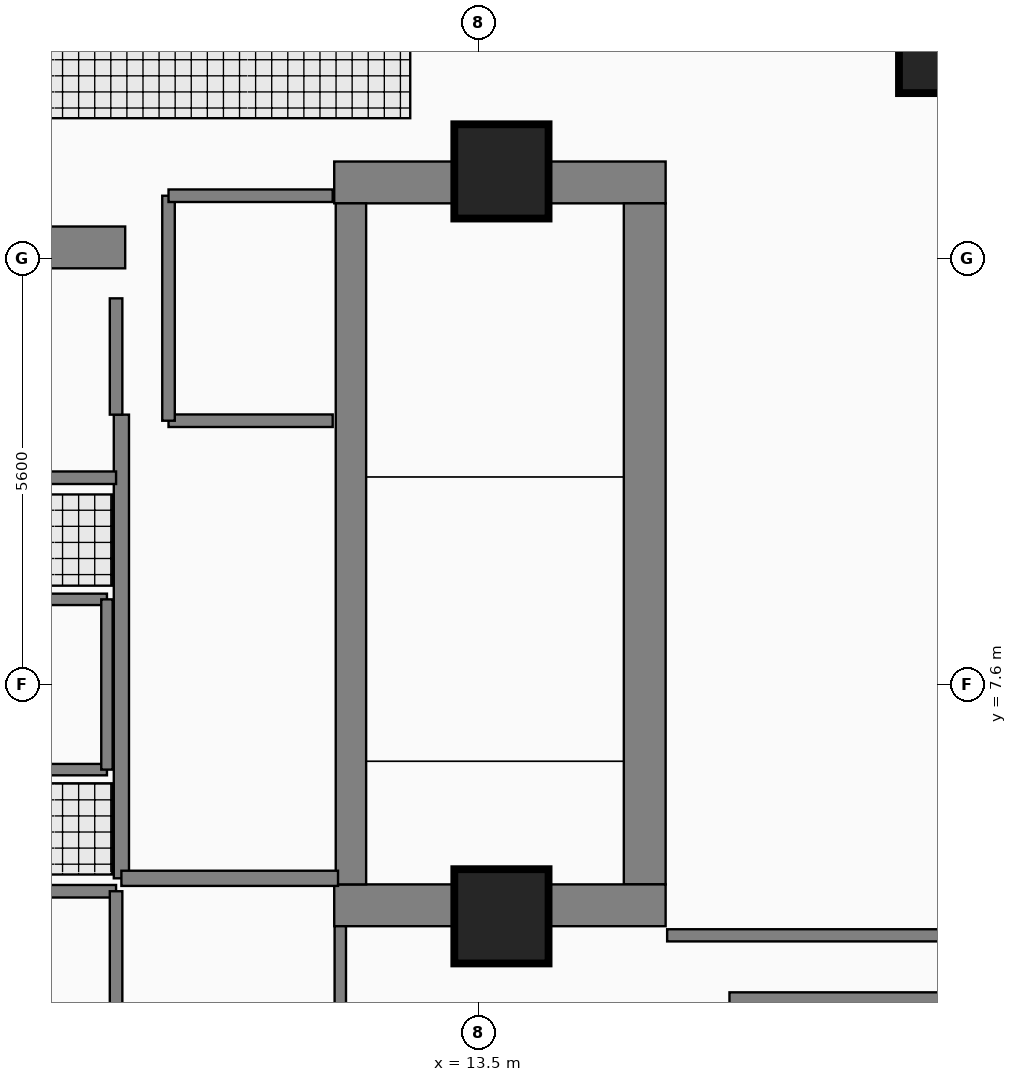
"""IFC4 building model, lengths in metres.
Left out: names, types, materials, properties, quantities, classifications, styles, units other than length and angle.
Written with IfcOpenShell. Run it as: python <this file> out.ifc"""

import sys

from ifc_helpers import new_model, si_unit, direction, frame, frame_2d, origin, origin_2d, place, context, subcontext, project, spatial, rectangle, extrude, element, fill, save


model = new_model("IFC4")
c1 = context("Model", 3, precision=1e-05, world=origin(), true_north=direction((0.0, 1.0)))
c2 = subcontext(c1, "Body", "Model", "MODEL_VIEW")
j1 = project(units=[si_unit("LENGTHUNIT", "METRE"), si_unit("PLANEANGLEUNIT", "RADIAN")], contexts=[c1])
p1 = place(None, origin())
s1 = spatial("IfcSite", under=j1, at=p1, CompositionType="ELEMENT")
p2 = place(p1, origin())
s2 = spatial("IfcBuilding", under=s1, at=p2, CompositionType="ELEMENT")
p3 = place(p2, frame((0.0, 0.0, 284.05)))
s3 = spatial("IfcBuildingStorey", under=s2, at=p3, CompositionType="ELEMENT", Elevation=284.05)
p4 = place(p3, frame((11.6, 14.205, 0.0), z_axis=(0.0, 0.0, 1.0), x_axis=(1.0, 0.0, 0.0)))
e1 = element("IfcWall", 1, at=p4, inside=s3, PredefinedType="SHEAR", context=c2, shape_type="SweptSolid", body=[
    extrude(rectangle(XDim=4.36, YDim=0.55, at=frame_2d((2.18, 0.0))), origin(), (0.0, 0.0, 1.0), 4.21),
])
p5 = place(p3, frame((15.685, 4.97, 0.0), z_axis=(0.0, 0.0, 1.0), x_axis=(0.0, 1.0, 0.0)))
e2 = element("IfcWall", 2, at=p5, inside=s3, PredefinedType="SHEAR", context=c2, shape_type="SweptSolid", body=[
    extrude(rectangle(XDim=8.96, YDim=0.55, at=frame_2d((4.48, 0.0))), origin(), (0.0, 0.0, 1.0), 4.21),
])
p6 = place(p3, frame((11.6, 4.695, 0.0), z_axis=(0.0, 0.0, 1.0), x_axis=(1.0, 0.0, 0.0)))
e3 = element("IfcWall", 3, at=p6, inside=s3, PredefinedType="SHEAR", context=c2, shape_type="SweptSolid", body=[
    extrude(rectangle(XDim=4.36, YDim=0.55, at=frame_2d((2.18, 0.0))), origin(), (0.0, 0.0, 1.0), 4.21),
])
p7 = place(p3, frame((1.25, 13.35, 0.0), z_axis=(0.0, 0.0, 1.0), x_axis=(1.0, 0.0, 0.0)))
e4 = element("IfcWall", 4, at=p7, inside=s3, PredefinedType="SHEAR", context=c2, shape_type="SweptSolid", body=[
    extrude(rectangle(XDim=7.6, YDim=0.55, at=frame_2d((3.8, 0.0))), origin(), (0.0, 0.0, 1.0), 4.18),
])
p8 = place(p3, frame((11.82, 13.93, 0.0), z_axis=(0.0, 0.0, 1.0), x_axis=(0.0, -1.0, 0.0)))
e5 = element("IfcWall", 5, at=p8, inside=s3, PredefinedType="SHEAR", context=c2, shape_type="SweptSolid", body=[
    extrude(rectangle(XDim=8.96, YDim=0.4, at=frame_2d((4.48, 0.0))), origin(), (0.0, 0.0, 1.0), 4.21),
])
p9 = place(p8, frame((7.53, 0.0, 0.0)))
e6 = element("IfcOpeningElement", 6, at=p9, cuts=e5, PredefinedType="OPENING", context=c2, shape_type="SweptSolid", body=[
    extrude(rectangle(XDim=1.12, YDim=2.22, at=frame_2d((0.56, 1.11))), frame((0.0, 0.21, 0.0), z_axis=(0.0, -1.0, 0.0), x_axis=(1.0, 0.0, 0.0)), (0.0, 0.0, 1.0), 0.42),
])
for number, where, z_axis, x_axis in (
    (7, (13.8, 14.35, 0.0), (0.0, 0.0, 1.0), (1.0, 0.0, 0.0)),
    (8, (13.8, 4.55, 0.0), (0.0, 0.0, 1.0), (1.0, 0.0, 0.0)),
):
    element("IfcColumn", number, at=place(p3, frame(where, z_axis=z_axis, x_axis=x_axis)), inside=s3, PredefinedType="COLUMN", context=c2, shape_type="SweptSolid", body=[
        extrude(rectangle(XDim=1.2, YDim=1.2, at=origin_2d()), origin(), (0.0, 0.0, 1.0), 4.4),
    ])
p10 = place(p3, frame((19.55, 15.9, 0.0), z_axis=(0.0, 0.0, 1.0), x_axis=(1.0, 0.0, 0.0)))
e9 = element("IfcColumn", 9, at=p10, inside=s3, PredefinedType="COLUMN", context=c2, shape_type="SweptSolid", body=[
    extrude(rectangle(XDim=1.0, YDim=1.0, at=origin_2d()), origin(), (0.0, 0.0, 1.0), 4.4),
])
p11 = place(p3, frame((20.2, 3.4, 0.0), z_axis=(0.0, 0.0, 1.0), x_axis=(-1.0, 0.0, 0.0)))
e10 = element("IfcWall", 10, at=p11, inside=s3, PredefinedType="STANDARD", context=c2, shape_type="SweptSolid", body=[
    extrude(rectangle(XDim=3.4, YDim=0.3, at=frame_2d((1.7, 0.0))), origin(), (0.0, 0.0, 1.0), 4.18),
])
p12 = place(p11, frame((1.125, 0.0, 1.25)))
e11 = element("IfcOpeningElement", 11, at=p12, cuts=e10, PredefinedType="OPENING", context=c2, shape_type="SweptSolid", body=[
    extrude(rectangle(XDim=1.15, YDim=1.55, at=frame_2d((0.575, 0.775))), frame((0.0, 0.16, 0.0), z_axis=(0.0, -1.0, 0.0), x_axis=(1.0, 0.0, 0.0)), (0.0, 0.0, 1.0), 0.32),
])
p13 = place(p3, frame((8.8, 11.15, 0.0), z_axis=(0.0, 0.0, 1.0), x_axis=(0.0, -1.0, 0.0)))
e12 = element("IfcWall", 12, at=p13, inside=s3, PredefinedType="PARTITIONING", context=c2, shape_type="SweptSolid", body=[
    extrude(rectangle(XDim=6.1, YDim=0.2, at=frame_2d((3.05, 0.0))), origin(), (0.0, 0.0, 1.0), 4.18),
])
p14 = place(p13, frame((1.15, 0.0, 0.0)))
e13 = element("IfcOpeningElement", 13, at=p14, cuts=e12, PredefinedType="OPENING", context=c2, shape_type="SweptSolid", body=[
    extrude(rectangle(XDim=1.1, YDim=2.2, at=frame_2d((0.55, 1.1))), frame((0.0, 0.11, 0.0), z_axis=(0.0, -1.0, 0.0), x_axis=(1.0, 0.0, 0.0)), (0.0, 0.0, 1.0), 0.22),
])
p15 = place(p13, frame((4.75, 0.0, 0.0)))
e14 = element("IfcOpeningElement", 14, at=p15, cuts=e12, PredefinedType="OPENING", context=c2, shape_type="SweptSolid", body=[
    extrude(rectangle(XDim=1.1, YDim=2.2, at=frame_2d((0.55, 1.1))), frame((0.0, 0.11, 0.0), z_axis=(0.0, -1.0, 0.0), x_axis=(1.0, 0.0, 0.0)), (0.0, 0.0, 1.0), 0.22),
])
p16 = place(p3, frame((9.42, 11.07, 0.0), z_axis=(0.0, 0.0, 1.0), x_axis=(1.0, 0.0, 0.0)))
e15 = element("IfcWall", 15, at=p16, inside=s3, PredefinedType="PARTITIONING", context=c2, shape_type="SweptSolid", body=[
    extrude(rectangle(XDim=2.16, YDim=0.165, at=frame_2d((1.08, 0.0))), origin(), (0.0, 0.0, 1.0), 4.18),
])
p17 = place(p16, frame((0.53, 0.0, 0.0)))
e16 = element("IfcOpeningElement", 16, at=p17, cuts=e15, PredefinedType="OPENING", context=c2, shape_type="SweptSolid", body=[
    extrude(rectangle(XDim=1.15, YDim=2.25, at=frame_2d((0.575, 1.125))), frame((0.0, 0.093, 0.0), z_axis=(0.0, -1.0, 0.0), x_axis=(1.0, 0.0, 0.0)), (0.0, 0.0, 1.0), 0.185),
])
p18 = place(p3, frame((6.25, 4.88, 0.0), z_axis=(0.0, 0.0, 1.0), x_axis=(1.0, 0.0, 0.0)))
e17 = element("IfcWall", 17, at=p18, inside=s3, PredefinedType="PARTITIONING", context=c2, shape_type="SweptSolid", body=[
    extrude(rectangle(XDim=2.48, YDim=0.165, at=frame_2d((1.24, 0.0))), origin(), (0.0, 0.0, 1.0), 4.18),
])
p19 = place(p18, frame((0.69, 0.0, 0.0)))
e18 = element("IfcOpeningElement", 18, at=p19, cuts=e17, PredefinedType="OPENING", context=c2, shape_type="SweptSolid", body=[
    extrude(rectangle(XDim=1.1, YDim=2.25, at=frame_2d((0.55, 1.125))), frame((0.0, 0.093, 0.0), z_axis=(0.0, -1.0, 0.0), x_axis=(1.0, 0.0, 0.0)), (0.0, 0.0, 1.0), 0.185),
])
p20 = place(p3, frame((6.25, 10.32, 0.0), z_axis=(0.0, 0.0, 1.0), x_axis=(1.0, 0.0, 0.0)))
e19 = element("IfcWall", 19, at=p20, inside=s3, PredefinedType="PARTITIONING", context=c2, shape_type="SweptSolid", body=[
    extrude(rectangle(XDim=2.48, YDim=0.165, at=frame_2d((1.24, 0.0))), origin(), (0.0, 0.0, 1.0), 4.18),
])
p21 = place(p20, frame((0.69, 0.0, 0.0)))
e20 = element("IfcOpeningElement", 20, at=p21, cuts=e19, PredefinedType="OPENING", context=c2, shape_type="SweptSolid", body=[
    extrude(rectangle(XDim=1.1, YDim=2.25, at=frame_2d((0.55, 1.125))), frame((0.0, 0.093, 0.0), z_axis=(0.0, -1.0, 0.0), x_axis=(1.0, 0.0, 0.0)), (0.0, 0.0, 1.0), 0.185),
])
p22 = place(p3, frame((6.14, 8.72, 0.0), z_axis=(0.0, 0.0, 1.0), x_axis=(1.0, 0.0, 0.0)))
e21 = element("IfcWall", 21, at=p22, inside=s3, PredefinedType="PARTITIONING", context=c2, shape_type="SweptSolid", body=[
    extrude(rectangle(XDim=2.47, YDim=0.15, at=frame_2d((1.235, 0.0))), origin(), (0.0, 0.0, 1.0), 4.18),
])
p23 = place(p22, frame((0.785, 0.0, 0.0)))
e22 = element("IfcOpeningElement", 22, at=p23, cuts=e21, PredefinedType="OPENING", context=c2, shape_type="SweptSolid", body=[
    extrude(rectangle(XDim=0.9, YDim=2.15, at=frame_2d((0.45, 1.075))), frame((0.0, 0.085, 0.0), z_axis=(0.0, -1.0, 0.0), x_axis=(1.0, 0.0, 0.0)), (0.0, 0.0, 1.0), 0.17),
])
p24 = place(p3, frame((15.98, 4.3, 0.0), z_axis=(0.0, 0.0, 1.0), x_axis=(1.0, 0.0, 0.0)))
e23 = element("IfcWall", 23, at=p24, inside=s3, PredefinedType="PARTITIONING", context=c2, shape_type="SweptSolid", body=[
    extrude(rectangle(XDim=4.16, YDim=0.16, at=frame_2d((2.08, 0.0))), origin(), (0.0, 0.0, 1.0), 4.18),
])
p25 = place(p24, frame((1.605, 0.0, 0.0)))
e24 = element("IfcOpeningElement", 24, at=p25, cuts=e23, PredefinedType="OPENING", context=c2, shape_type="SweptSolid", body=[
    extrude(rectangle(XDim=0.95, YDim=2.15, at=frame_2d((0.475, 1.075))), frame((0.0, 0.09, 0.0), z_axis=(0.0, -1.0, 0.0), x_axis=(1.0, 0.0, 0.0)), (0.0, 0.0, 1.0), 0.18),
])
p26 = place(p3, frame((8.8, 5.05, 0.0), z_axis=(0.0, 0.0, 1.0), x_axis=(1.0, 0.0, 0.0)))
e25 = element("IfcWall", 25, at=p26, inside=s3, PredefinedType="PARTITIONING", context=c2, shape_type="SweptSolid", body=[
    extrude(rectangle(XDim=2.85, YDim=0.2, at=frame_2d((1.425, 0.0))), origin(), (0.0, 0.0, 1.0), 4.18),
])
p27 = place(p3, frame((9.42, 11.07, 0.0), z_axis=(0.0, 0.0, 1.0), x_axis=(0.0, 1.0, 0.0)))
e26 = element("IfcWall", 26, at=p27, inside=s3, PredefinedType="PARTITIONING", context=c2, shape_type="SweptSolid", body=[
    extrude(rectangle(XDim=2.96, YDim=0.165, at=frame_2d((1.48, 0.0))), origin(), (0.0, 0.0, 1.0), 4.18),
])
p28 = place(p3, frame((9.42, 14.03, 0.0), z_axis=(0.0, 0.0, 1.0), x_axis=(1.0, 0.0, 0.0)))
e27 = element("IfcWall", 27, at=p28, inside=s3, PredefinedType="PARTITIONING", context=c2, shape_type="SweptSolid", body=[
    extrude(rectangle(XDim=2.16, YDim=0.165, at=frame_2d((1.08, 0.0))), origin(), (0.0, 0.0, 1.0), 4.18),
])
p29 = place(p3, frame((8.73, 2.52, 0.0), z_axis=(0.0, 0.0, 1.0), x_axis=(0.0, 1.0, 0.0)))
e28 = element("IfcWall", 28, at=p29, inside=s3, PredefinedType="PARTITIONING", context=c2, shape_type="SweptSolid", body=[
    extrude(rectangle(XDim=2.36, YDim=0.165, at=frame_2d((1.18, 0.0))), origin(), (0.0, 0.0, 1.0), 4.18),
])
p30 = place(p3, frame((8.73, 11.15, 0.0), z_axis=(0.0, 0.0, 1.0), x_axis=(0.0, 1.0, 0.0)))
e29 = element("IfcWall", 29, at=p30, inside=s3, PredefinedType="PARTITIONING", context=c2, shape_type="SweptSolid", body=[
    extrude(rectangle(XDim=1.53, YDim=0.165, at=frame_2d((0.765, 0.0))), origin(), (0.0, 0.0, 1.0), 4.18),
])
p31 = place(p3, frame((6.14, 6.48, 0.0), z_axis=(0.0, 0.0, 1.0), x_axis=(1.0, 0.0, 0.0)))
e30 = element("IfcWall", 30, at=p31, inside=s3, PredefinedType="PARTITIONING", context=c2, shape_type="SweptSolid", body=[
    extrude(rectangle(XDim=2.47, YDim=0.15, at=frame_2d((1.235, 0.0))), origin(), (0.0, 0.0, 1.0), 4.18),
])
p32 = place(p3, frame((8.61, 6.48, 0.0), z_axis=(0.0, 0.0, 1.0), x_axis=(0.0, 1.0, 0.0)))
e31 = element("IfcWall", 31, at=p32, inside=s3, PredefinedType="PARTITIONING", context=c2, shape_type="SweptSolid", body=[
    extrude(rectangle(XDim=2.24, YDim=0.15, at=frame_2d((1.12, 0.0))), origin(), (0.0, 0.0, 1.0), 4.18),
])
p33 = place(p3, frame((11.68, 1.72, 0.0), z_axis=(0.0, 0.0, 1.0), x_axis=(0.0, 1.0, 0.0)))
e32 = element("IfcWall", 32, at=p33, inside=s3, PredefinedType="PARTITIONING", context=c2, shape_type="SweptSolid", body=[
    extrude(rectangle(XDim=2.7, YDim=0.15, at=frame_2d((1.35, 0.0))), origin(), (0.0, 0.0, 1.0), 4.18),
])
p34 = place(p12, origin())
e33 = element("IfcWindow", 33, at=p34, inside=s3, PartitioningType="SINGLE_PANEL", PredefinedType="WINDOW", context=c2, shape_type="SweptSolid", body=[
    extrude(rectangle(XDim=1.15, YDim=1.55, at=frame_2d((0.575, 0.775))), frame((0.0, 0.03, 0.0), z_axis=(0.0, -1.0, 0.0), x_axis=(1.0, 0.0, 0.0)), (0.0, 0.0, 1.0), 0.06),
])
fill(e11, e33)
p35 = place(p9, origin())
e34 = element("IfcDoor", 34, at=p35, inside=s3, OperationType="SINGLE_SWING_RIGHT", PredefinedType="DOOR", context=c2, shape_type="SweptSolid", body=[
    extrude(rectangle(XDim=1.12, YDim=2.22, at=frame_2d((0.56, 1.11))), frame((0.0, 0.025, 0.0), z_axis=(0.0, -1.0, 0.0), x_axis=(1.0, 0.0, 0.0)), (0.0, 0.0, 1.0), 0.05),
])
fill(e6, e34)
p36 = place(p14, origin())
e35 = element("IfcDoor", 35, at=p36, inside=s3, OperationType="SINGLE_SWING_LEFT", PredefinedType="DOOR", context=c2, shape_type="SweptSolid", body=[
    extrude(rectangle(XDim=1.1, YDim=2.2, at=frame_2d((0.55, 1.1))), frame((0.0, 0.025, 0.0), z_axis=(0.0, -1.0, 0.0), x_axis=(1.0, 0.0, 0.0)), (0.0, 0.0, 1.0), 0.05),
])
fill(e13, e35)
p37 = place(p15, origin())
e36 = element("IfcDoor", 36, at=p37, inside=s3, OperationType="SINGLE_SWING_RIGHT", PredefinedType="DOOR", context=c2, shape_type="SweptSolid", body=[
    extrude(rectangle(XDim=1.1, YDim=2.2, at=frame_2d((0.55, 1.1))), frame((0.0, 0.025, 0.0), z_axis=(0.0, -1.0, 0.0), x_axis=(1.0, 0.0, 0.0)), (0.0, 0.0, 1.0), 0.05),
])
fill(e14, e36)
p38 = place(p17, origin())
e37 = element("IfcDoor", 37, at=p38, inside=s3, OperationType="SLIDING_TO_LEFT", PredefinedType="DOOR", context=c2, shape_type="SweptSolid", body=[
    extrude(rectangle(XDim=1.15, YDim=2.25, at=frame_2d((0.575, 1.125))), frame((0.0, 0.025, 0.0), z_axis=(0.0, -1.0, 0.0), x_axis=(1.0, 0.0, 0.0)), (0.0, 0.0, 1.0), 0.05),
])
fill(e16, e37)
p39 = place(p19, origin())
e38 = element("IfcDoor", 38, at=p39, inside=s3, OperationType="SLIDING_TO_LEFT", PredefinedType="DOOR", context=c2, shape_type="SweptSolid", body=[
    extrude(rectangle(XDim=1.1, YDim=2.25, at=frame_2d((0.55, 1.125))), frame((0.0, 0.025, 0.0), z_axis=(0.0, -1.0, 0.0), x_axis=(1.0, 0.0, 0.0)), (0.0, 0.0, 1.0), 0.05),
])
fill(e18, e38)
p40 = place(p21, origin())
e39 = element("IfcDoor", 39, at=p40, inside=s3, OperationType="SLIDING_TO_LEFT", PredefinedType="DOOR", context=c2, shape_type="SweptSolid", body=[
    extrude(rectangle(XDim=1.1, YDim=2.25, at=frame_2d((0.55, 1.125))), frame((0.0, 0.025, 0.0), z_axis=(0.0, -1.0, 0.0), x_axis=(1.0, 0.0, 0.0)), (0.0, 0.0, 1.0), 0.05),
])
fill(e20, e39)
p41 = place(p25, origin())
e40 = element("IfcDoor", 40, at=p41, inside=s3, OperationType="SINGLE_SWING_LEFT", PredefinedType="DOOR", context=c2, shape_type="SweptSolid", body=[
    extrude(rectangle(XDim=0.95, YDim=2.15, at=frame_2d((0.475, 1.075))), frame((0.0, 0.025, 0.0), z_axis=(0.0, -1.0, 0.0), x_axis=(1.0, 0.0, 0.0)), (0.0, 0.0, 1.0), 0.05),
])
fill(e24, e40)
save(model, sys.argv[1])
